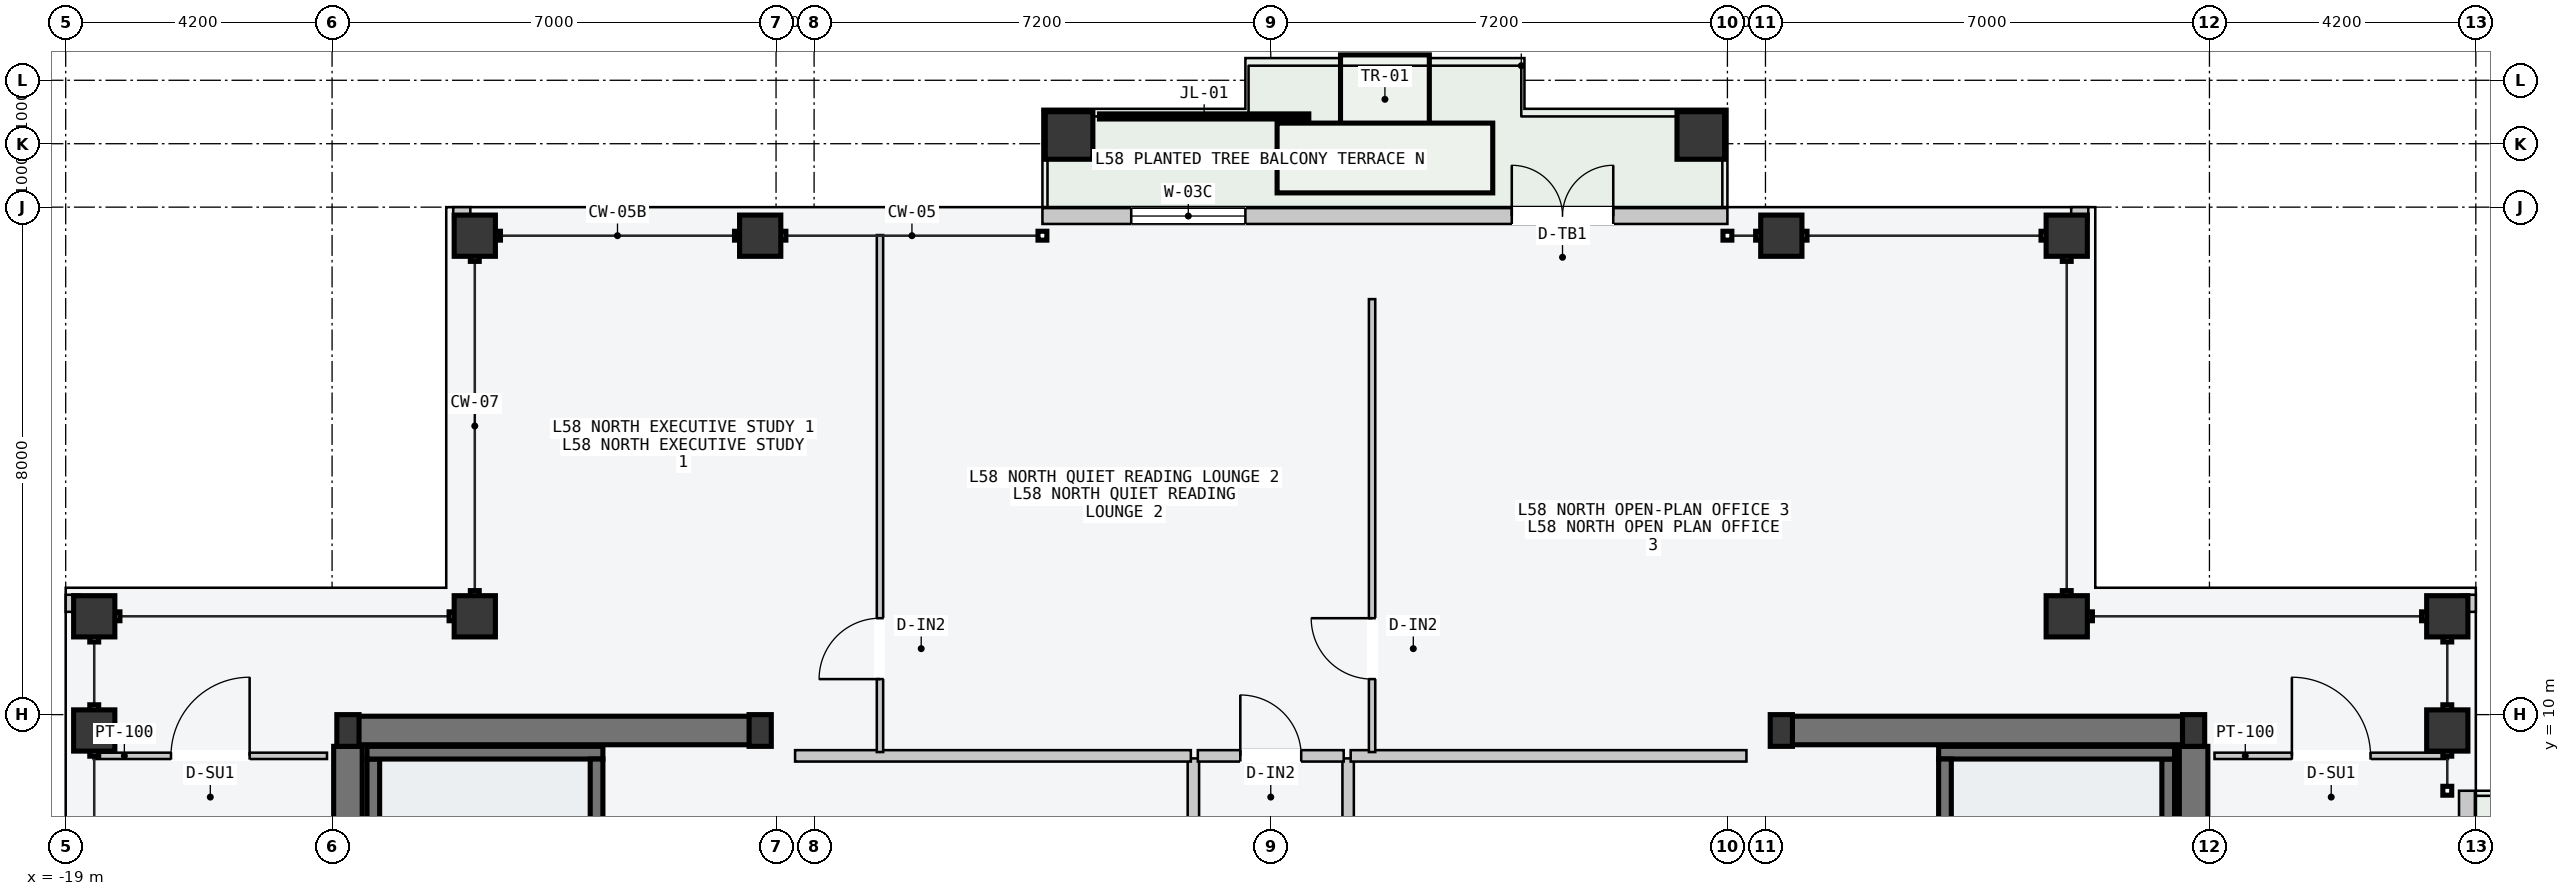
"""IFC4 building model, lengths in metres.
Left out: names, types, materials, properties, quantities, classifications, styles, units other than length and angle.
Written with IfcOpenShell. Run it as: python <this file> out.ifc"""

import sys

from ifc_helpers import new_model, si_unit, direction, frame, frame_2d, origin, origin_2d, place, context, subcontext, project, spatial, rectangle, hollow_rectangle, i_section, extrude, element, fill, save


model = new_model("IFC4")
c1 = context("Model", 3, precision=1e-05, world=origin(), true_north=direction((0.0, 1.0)))
c2 = subcontext(c1, "Body", "Model", "MODEL_VIEW")
j1 = project(units=[si_unit("LENGTHUNIT", "METRE"), si_unit("PLANEANGLEUNIT", "RADIAN")], contexts=[c1])
p1 = place(None, origin())
s1 = spatial("IfcSite", under=j1, at=p1, CompositionType="ELEMENT")
p2 = place(p1, origin())
s2 = spatial("IfcBuilding", under=s1, at=p2, CompositionType="ELEMENT")
p3 = place(p2, frame((0.0, 0.0, 222.0)))
s3 = spatial("IfcBuildingStorey", under=s2, at=p3, CompositionType="ELEMENT", Elevation=222.0)
p4 = place(p3, frame((-14.53, 9.75, -0.2), z_axis=(0.0, 0.0, 1.0), x_axis=(1.0, 0.0, 0.0)))
e1 = element("IfcWall", 1, at=p4, inside=s3, PredefinedType="SHEAR", context=c2, shape_type="SweptSolid", body=[
    extrude(rectangle(XDim=6.46, YDim=0.45, at=frame_2d((3.23, 0.0))), origin(), (0.0, 0.0, 1.0), 3.6),
])
p5 = place(p3, frame((-14.55, 0.25, -0.2), z_axis=(0.0, 0.0, 1.0), x_axis=(0.0, 1.0, 0.0)))
e2 = element("IfcWall", 2, at=p5, inside=s3, PredefinedType="SHEAR", context=c2, shape_type="SweptSolid", body=[
    extrude(rectangle(XDim=9.25, YDim=0.45, at=frame_2d((4.625, 0.0))), origin(), (0.0, 0.0, 1.0), 3.6),
])
p6 = place(p3, frame((8.07, 9.75, -0.2), z_axis=(0.0, 0.0, 1.0), x_axis=(1.0, 0.0, 0.0)))
e3 = element("IfcWall", 3, at=p6, inside=s3, PredefinedType="SHEAR", context=c2, shape_type="SweptSolid", body=[
    extrude(rectangle(XDim=6.46, YDim=0.45, at=frame_2d((3.23, 0.0))), origin(), (0.0, 0.0, 1.0), 3.6),
])
p7 = place(p3, frame((14.55, 0.25, -0.2), z_axis=(0.0, 0.0, 1.0), x_axis=(0.0, 1.0, 0.0)))
e4 = element("IfcWall", 4, at=p7, inside=s3, PredefinedType="SHEAR", context=c2, shape_type="SweptSolid", body=[
    extrude(rectangle(XDim=9.25, YDim=0.45, at=frame_2d((4.625, 0.0))), origin(), (0.0, 0.0, 1.0), 3.6),
])
for number, where, z_axis, x_axis in (
    (5, (-14.15, 1.5, -0.2), (0.0, 0.0, 1.0), (0.0, 1.0, 0.0)),
    (6, (14.15, 1.5, -0.2), (0.0, 0.0, 1.0), (0.0, 1.0, 0.0)),
):
    element("IfcWall", number, at=place(p3, frame(where, z_axis=z_axis, x_axis=x_axis)), inside=s3, PredefinedType="SOLIDWALL", context=c2, shape_type="SweptSolid", body=[
        extrude(rectangle(XDim=7.8, YDim=0.2, at=frame_2d((3.9, 0.0))), origin(), (0.0, 0.0, 1.0), 3.6),
    ])
p8 = place(p3, frame((-14.25, 9.4, -0.2), z_axis=(0.0, 0.0, 1.0), x_axis=(1.0, 0.0, 0.0)))
e7 = element("IfcWall", 7, at=p8, inside=s3, PredefinedType="SOLIDWALL", context=c2, shape_type="SweptSolid", body=[
    extrude(rectangle(XDim=3.72, YDim=0.2, at=frame_2d((1.86, 0.0))), origin(), (0.0, 0.0, 1.0), 3.6),
])
p9 = place(p3, frame((-10.63, 1.5, -0.2), z_axis=(0.0, 0.0, 1.0), x_axis=(0.0, 1.0, 0.0)))
e8 = element("IfcWall", 8, at=p9, inside=s3, PredefinedType="SOLIDWALL", context=c2, shape_type="SweptSolid", body=[
    extrude(rectangle(XDim=7.8, YDim=0.2, at=frame_2d((3.9, 0.0))), origin(), (0.0, 0.0, 1.0), 3.6),
])
p10 = place(p3, frame((10.53, 9.4, -0.2), z_axis=(0.0, 0.0, 1.0), x_axis=(1.0, 0.0, 0.0)))
e9 = element("IfcWall", 9, at=p10, inside=s3, PredefinedType="SOLIDWALL", context=c2, shape_type="SweptSolid", body=[
    extrude(rectangle(XDim=3.72, YDim=0.2, at=frame_2d((1.86, 0.0))), origin(), (0.0, 0.0, 1.0), 3.6),
])
p11 = place(p3, frame((10.63, 1.5, -0.2), z_axis=(0.0, 0.0, 1.0), x_axis=(0.0, 1.0, 0.0)))
e10 = element("IfcWall", 10, at=p11, inside=s3, PredefinedType="SOLIDWALL", context=c2, shape_type="SweptSolid", body=[
    extrude(rectangle(XDim=7.8, YDim=0.2, at=frame_2d((3.9, 0.0))), origin(), (0.0, 0.0, 1.0), 3.6),
])
for number, where, z_axis, x_axis in (
    (11, (-14.55, 9.75, 0.0), (0.0, 0.0, 1.0), (1.0, 0.0, 0.0)),
    (12, (-8.05, 9.75, 0.0), (0.0, 0.0, 1.0), (1.0, 0.0, 0.0)),
    (13, (8.05, 9.75, 0.0), (0.0, 0.0, 1.0), (1.0, 0.0, 0.0)),
    (14, (14.55, 9.75, 0.0), (0.0, 0.0, 1.0), (1.0, 0.0, 0.0)),
):
    element("IfcColumn", number, at=place(p3, frame(where, z_axis=z_axis, x_axis=x_axis)), inside=s3, PredefinedType="COLUMN", context=c2, shape_type="SweptSolid", body=[
        extrude(i_section(OverallWidth=0.35, OverallDepth=0.5, WebThickness=0.02, FlangeThickness=0.032, at=origin_2d()), origin(), (0.0, 0.0, 1.0), 3.6),
    ])
for number, where, z_axis, x_axis in (
    (15, (-12.55, 17.55, 0.0), (0.0, 0.0, 1.0), (1.0, 0.0, 0.0)),
    (16, (-8.05, 17.55, 0.0), (0.0, 0.0, 1.0), (1.0, 0.0, 0.0)),
    (17, (8.05, 17.55, 0.0), (0.0, 0.0, 1.0), (1.0, 0.0, 0.0)),
    (18, (12.55, 17.55, 0.0), (0.0, 0.0, 1.0), (1.0, 0.0, 0.0)),
    (19, (-18.55, 9.75, 0.0), (0.0, 0.0, 1.0), (0.0, 1.0, 0.0)),
    (20, (-18.55, 11.55, 0.0), (0.0, 0.0, 1.0), (0.0, 1.0, 0.0)),
    (21, (18.55, 9.75, 0.0), (0.0, 0.0, 1.0), (0.0, 1.0, 0.0)),
    (22, (18.55, 11.55, 0.0), (0.0, 0.0, 1.0), (0.0, 1.0, 0.0)),
    (23, (-12.55, 11.55, 0.0), (0.0, 0.0, 1.0), (1.0, 0.0, 0.0)),
    (24, (12.55, 11.55, 0.0), (0.0, 0.0, 1.0), (1.0, 0.0, 0.0)),
):
    element("IfcColumn", number, at=place(p3, frame(where, z_axis=z_axis, x_axis=x_axis)), inside=s3, PredefinedType="COLUMN", context=c2, shape_type="SweptSolid", body=[
        extrude(hollow_rectangle(XDim=0.65, YDim=0.65, WallThickness=0.028, at=origin_2d()), origin(), (0.0, 0.0, 1.0), 3.6),
    ])
for number, where, z_axis, x_axis in (
    (25, (-3.18, 19.13, -0.2), (0.0, 0.0, 1.0), (1.0, 0.0, 0.0)),
    (26, (6.78, 19.13, -0.2), (0.0, 0.0, 1.0), (1.0, 0.0, 0.0)),
):
    element("IfcColumn", number, at=place(p3, frame(where, z_axis=z_axis, x_axis=x_axis)), inside=s3, PredefinedType="COLUMN", context=c2, shape_type="SweptSolid", body=[
        extrude(hollow_rectangle(XDim=0.75, YDim=0.75, WallThickness=0.032, at=origin_2d()), origin(), (0.0, 0.0, 1.0), 3.8),
    ])
p12 = place(p3, frame((-3.6, 17.86, 0.0), z_axis=(0.0, 0.0, 1.0), x_axis=(1.0, 0.0, 0.0)))
e27 = element("IfcWall", 27, at=p12, inside=s3, PredefinedType="STANDARD", context=c2, shape_type="SweptSolid", body=[
    extrude(rectangle(XDim=10.8, YDim=0.25, at=frame_2d((5.4, 0.0))), origin(), (0.0, 0.0, 1.0), 3.4),
])
p13 = place(p12, frame((7.4, 0.0, 0.0)))
e28 = element("IfcOpeningElement", 28, at=p13, cuts=e27, PredefinedType="OPENING", context=c2, shape_type="SweptSolid", body=[
    extrude(rectangle(XDim=1.6, YDim=2.2, at=frame_2d((0.8, 1.1))), frame((0.0, 0.135, 0.0), z_axis=(0.0, -1.0, 0.0), x_axis=(1.0, 0.0, 0.0)), (0.0, 0.0, 1.0), 0.27),
])
p14 = place(p12, frame((1.4, 0.0, 0.85)))
e29 = element("IfcOpeningElement", 29, at=p14, cuts=e27, PredefinedType="OPENING", context=c2, shape_type="SweptSolid", body=[
    extrude(rectangle(XDim=1.8, YDim=2.05, at=frame_2d((0.9, 1.025))), frame((0.0, 0.135, 0.0), z_axis=(0.0, -1.0, 0.0), x_axis=(1.0, 0.0, 0.0)), (0.0, 0.0, 1.0), 0.27),
])
p15 = place(p3, frame((18.86, -2.0, 0.0), z_axis=(0.0, 0.0, 1.0), x_axis=(0.0, 1.0, 0.0)))
e30 = element("IfcWall", 30, at=p15, inside=s3, PredefinedType="STANDARD", context=c2, shape_type="SweptSolid", body=[
    extrude(rectangle(XDim=10.8, YDim=0.25, at=frame_2d((5.4, 0.0))), origin(), (0.0, 0.0, 1.0), 3.4),
])
p16 = place(p15, frame((6.6, 0.0, 0.0)))
e31 = element("IfcOpeningElement", 31, at=p16, cuts=e30, PredefinedType="OPENING", context=c2, shape_type="SweptSolid", body=[
    extrude(rectangle(XDim=1.6, YDim=2.2, at=frame_2d((0.8, 1.1))), frame((0.0, 0.135, 0.0), z_axis=(0.0, -1.0, 0.0), x_axis=(1.0, 0.0, 0.0)), (0.0, 0.0, 1.0), 0.27),
])
p17 = place(p15, frame((1.4, 0.0, 0.85)))
e32 = element("IfcOpeningElement", 32, at=p17, cuts=e30, PredefinedType="OPENING", context=c2, shape_type="SweptSolid", body=[
    extrude(rectangle(XDim=1.8, YDim=2.05, at=frame_2d((0.9, 1.025))), frame((0.0, 0.135, 0.0), z_axis=(0.0, -1.0, 0.0), x_axis=(1.0, 0.0, 0.0)), (0.0, 0.0, 1.0), 0.27),
])
for number, where, z_axis, x_axis in (
    (33, (-12.89, 17.89, 0.0), (0.0, 0.0, 1.0), (1.0, 0.0, 0.0)),
    (34, (-18.89, 11.62, 0.0), (0.0, 0.0, 1.0), (0.0, 1.0, 0.0)),
    (35, (12.62, 17.89, 0.0), (0.0, 0.0, 1.0), (1.0, 0.0, 0.0)),
    (36, (18.89, 11.62, 0.0), (0.0, 0.0, 1.0), (0.0, 1.0, 0.0)),
):
    element("IfcWall", number, at=place(p3, frame(where, z_axis=z_axis, x_axis=x_axis)), inside=s3, PredefinedType="PARAPET", context=c2, shape_type="SweptSolid", body=[
        extrude(rectangle(XDim=0.27, YDim=0.22, at=frame_2d((0.135, 0.0))), origin(), (0.0, 0.0, 1.0), 1.2),
    ])
p18 = place(p3, frame((-1.22, -3.5, 0.0), z_axis=(0.0, 0.0, 1.0), x_axis=(0.0, 1.0, 0.0)))
e37 = element("IfcWall", 37, at=p18, inside=s3, PredefinedType="PARTITIONING", context=c2, shape_type="SweptSolid", body=[
    extrude(rectangle(XDim=12.81, YDim=0.18, at=frame_2d((6.405, 0.0))), origin(), (0.0, 0.0, 1.0), 3.4),
])
p19 = place(p18, frame((6.1, 0.0, 0.0)))
e38 = element("IfcOpeningElement", 38, at=p19, cuts=e37, PredefinedType="OPENING", context=c2, shape_type="SweptSolid", body=[
    extrude(rectangle(XDim=1.24, YDim=2.24, at=frame_2d((0.62, 1.12))), frame((0.0, 0.1, 0.0), z_axis=(0.0, -1.0, 0.0), x_axis=(1.0, 0.0, 0.0)), (0.0, 0.0, 1.0), 0.2),
])
p20 = place(p18, frame((1.6, 0.0, 0.0)))
e39 = element("IfcOpeningElement", 39, at=p20, cuts=e37, PredefinedType="OPENING", context=c2, shape_type="SweptSolid", body=[
    extrude(rectangle(XDim=0.96, YDim=2.18, at=frame_2d((0.48, 1.09))), frame((0.0, 0.1, 0.0), z_axis=(0.0, -1.0, 0.0), x_axis=(1.0, 0.0, 0.0)), (0.0, 0.0, 1.0), 0.2),
])
p21 = place(p3, frame((-7.5, 9.35, 0.0), z_axis=(0.0, 0.0, 1.0), x_axis=(1.0, 0.0, 0.0)))
e40 = element("IfcWall", 40, at=p21, inside=s3, PredefinedType="PARTITIONING", context=c2, shape_type="SweptSolid", body=[
    extrude(rectangle(XDim=6.24, YDim=0.18, at=frame_2d((3.12, 0.0))), origin(), (0.0, 0.0, 1.0), 3.4),
])
p22 = place(p3, frame((1.22, -3.5, 0.0), z_axis=(0.0, 0.0, 1.0), x_axis=(0.0, 1.0, 0.0)))
e41 = element("IfcWall", 41, at=p22, inside=s3, PredefinedType="PARTITIONING", context=c2, shape_type="SweptSolid", body=[
    extrude(rectangle(XDim=12.81, YDim=0.18, at=frame_2d((6.405, 0.0))), origin(), (0.0, 0.0, 1.0), 3.4),
])
p23 = place(p22, frame((6.1, 0.0, 0.0)))
e42 = element("IfcOpeningElement", 42, at=p23, cuts=e41, PredefinedType="OPENING", context=c2, shape_type="SweptSolid", body=[
    extrude(rectangle(XDim=1.24, YDim=2.24, at=frame_2d((0.62, 1.12))), frame((0.0, 0.1, 0.0), z_axis=(0.0, -1.0, 0.0), x_axis=(1.0, 0.0, 0.0)), (0.0, 0.0, 1.0), 0.2),
])
p24 = place(p22, frame((1.6, 0.0, 0.0)))
e43 = element("IfcOpeningElement", 43, at=p24, cuts=e41, PredefinedType="OPENING", context=c2, shape_type="SweptSolid", body=[
    extrude(rectangle(XDim=0.96, YDim=2.18, at=frame_2d((0.48, 1.09))), frame((0.0, 0.1, 0.0), z_axis=(0.0, -1.0, 0.0), x_axis=(1.0, 0.0, 0.0)), (0.0, 0.0, 1.0), 0.2),
])
p25 = place(p3, frame((1.26, 9.35, 0.0), z_axis=(0.0, 0.0, 1.0), x_axis=(1.0, 0.0, 0.0)))
e44 = element("IfcWall", 44, at=p25, inside=s3, PredefinedType="PARTITIONING", context=c2, shape_type="SweptSolid", body=[
    extrude(rectangle(XDim=6.24, YDim=0.18, at=frame_2d((3.12, 0.0))), origin(), (0.0, 0.0, 1.0), 3.4),
])
p26 = place(p3, frame((-6.161, 9.41, 0.0), z_axis=(0.0, 0.0, 1.0), x_axis=(0.0, 1.0, 0.0)))
e45 = element("IfcWall", 45, at=p26, inside=s3, PredefinedType="PARTITIONING", context=c2, shape_type="SweptSolid", body=[
    extrude(rectangle(XDim=8.15, YDim=0.1, at=frame_2d((4.075, 0.0))), origin(), (0.0, 0.0, 1.0), 3.4),
])
p27 = place(p26, frame((1.15, 0.0, 0.0)))
e46 = element("IfcOpeningElement", 46, at=p27, cuts=e45, PredefinedType="OPENING", context=c2, shape_type="SweptSolid", body=[
    extrude(rectangle(XDim=0.96, YDim=2.18, at=frame_2d((0.48, 1.09))), frame((0.0, 0.06, 0.0), z_axis=(0.0, -1.0, 0.0), x_axis=(1.0, 0.0, 0.0)), (0.0, 0.0, 1.0), 0.12),
])
p28 = place(p3, frame((1.597, 9.41, 0.0), z_axis=(0.0, 0.0, 1.0), x_axis=(0.0, 1.0, 0.0)))
e47 = element("IfcWall", 47, at=p28, inside=s3, PredefinedType="PARTITIONING", context=c2, shape_type="SweptSolid", body=[
    extrude(rectangle(XDim=7.14, YDim=0.1, at=frame_2d((3.57, 0.0))), origin(), (0.0, 0.0, 1.0), 3.4),
])
p29 = place(p28, frame((1.15, 0.0, 0.0)))
e48 = element("IfcOpeningElement", 48, at=p29, cuts=e47, PredefinedType="OPENING", context=c2, shape_type="SweptSolid", body=[
    extrude(rectangle(XDim=0.96, YDim=2.18, at=frame_2d((0.48, 1.09))), frame((0.0, 0.06, 0.0), z_axis=(0.0, -1.0, 0.0), x_axis=(1.0, 0.0, 0.0)), (0.0, 0.0, 1.0), 0.12),
])
p30 = place(p3, frame((-1.15, 9.35, 0.0), z_axis=(0.0, 0.0, 1.0), x_axis=(1.0, 0.0, 0.0)))
e49 = element("IfcWall", 49, at=p30, inside=s3, PredefinedType="PARTITIONING", context=c2, shape_type="SweptSolid", body=[
    extrude(rectangle(XDim=2.3, YDim=0.18, at=frame_2d((1.15, 0.0))), origin(), (0.0, 0.0, 1.0), 3.4),
])
p31 = place(p30, frame((0.67, 0.0, 0.0)))
e50 = element("IfcOpeningElement", 50, at=p31, cuts=e49, PredefinedType="OPENING", context=c2, shape_type="SweptSolid", body=[
    extrude(rectangle(XDim=0.96, YDim=2.18, at=frame_2d((0.48, 1.09))), frame((0.0, 0.1, 0.0), z_axis=(0.0, -1.0, 0.0), x_axis=(1.0, 0.0, 0.0)), (0.0, 0.0, 1.0), 0.2),
])
p32 = place(p3, frame((-18.56, 9.35, 0.0), z_axis=(0.0, 0.0, 1.0), x_axis=(1.0, 0.0, 0.0)))
e51 = element("IfcWall", 51, at=p32, inside=s3, PredefinedType="PARTITIONING", context=c2, shape_type="SweptSolid", body=[
    extrude(rectangle(XDim=3.68, YDim=0.1, at=frame_2d((1.84, 0.0))), origin(), (0.0, 0.0, 1.0), 3.4),
])
p33 = place(p32, frame((1.22, 0.0, 0.0)))
e52 = element("IfcOpeningElement", 52, at=p33, cuts=e51, PredefinedType="OPENING", context=c2, shape_type="SweptSolid", body=[
    extrude(rectangle(XDim=1.24, YDim=2.24, at=frame_2d((0.62, 1.12))), frame((0.0, 0.06, 0.0), z_axis=(0.0, -1.0, 0.0), x_axis=(1.0, 0.0, 0.0)), (0.0, 0.0, 1.0), 0.12),
])
p34 = place(p3, frame((14.88, 9.35, 0.0), z_axis=(0.0, 0.0, 1.0), x_axis=(1.0, 0.0, 0.0)))
e53 = element("IfcWall", 53, at=p34, inside=s3, PredefinedType="PARTITIONING", context=c2, shape_type="SweptSolid", body=[
    extrude(rectangle(XDim=3.68, YDim=0.1, at=frame_2d((1.84, 0.0))), origin(), (0.0, 0.0, 1.0), 3.4),
])
p35 = place(p34, frame((1.22, 0.0, 0.0)))
e54 = element("IfcOpeningElement", 54, at=p35, cuts=e53, PredefinedType="OPENING", context=c2, shape_type="SweptSolid", body=[
    extrude(rectangle(XDim=1.24, YDim=2.24, at=frame_2d((0.62, 1.12))), frame((0.0, 0.06, 0.0), z_axis=(0.0, -1.0, 0.0), x_axis=(1.0, 0.0, 0.0)), (0.0, 0.0, 1.0), 0.12),
])
p36 = place(p13, origin())
e55 = element("IfcDoor", 55, at=p36, inside=s3, OperationType="DOUBLE_DOOR_SINGLE_SWING", PredefinedType="DOOR", context=c2, shape_type="SweptSolid", body=[
    extrude(rectangle(XDim=1.6, YDim=2.2, at=frame_2d((0.8, 1.1))), frame((0.0, 0.025, 0.0), z_axis=(0.0, -1.0, 0.0), x_axis=(1.0, 0.0, 0.0)), (0.0, 0.0, 1.0), 0.05),
])
fill(e28, e55)
p37 = place(p14, origin())
e56 = element("IfcWindow", 56, at=p37, inside=s3, PartitioningType="SINGLE_PANEL", PredefinedType="WINDOW", context=c2, shape_type="SweptSolid", body=[
    extrude(rectangle(XDim=1.8, YDim=2.05, at=frame_2d((0.9, 1.025))), frame((0.0, 0.03, 0.0), z_axis=(0.0, -1.0, 0.0), x_axis=(1.0, 0.0, 0.0)), (0.0, 0.0, 1.0), 0.06),
])
fill(e29, e56)
p38 = place(p27, origin())
e57 = element("IfcDoor", 57, at=p38, inside=s3, OperationType="SINGLE_SWING_LEFT", PredefinedType="DOOR", context=c2, shape_type="SweptSolid", body=[
    extrude(rectangle(XDim=0.96, YDim=2.18, at=frame_2d((0.48, 1.09))), frame((0.0, 0.025, 0.0), z_axis=(0.0, -1.0, 0.0), x_axis=(1.0, 0.0, 0.0)), (0.0, 0.0, 1.0), 0.05),
])
fill(e46, e57)
p39 = place(p29, origin())
e58 = element("IfcDoor", 58, at=p39, inside=s3, OperationType="SINGLE_SWING_RIGHT", PredefinedType="DOOR", context=c2, shape_type="SweptSolid", body=[
    extrude(rectangle(XDim=0.96, YDim=2.18, at=frame_2d((0.48, 1.09))), frame((0.0, 0.025, 0.0), z_axis=(0.0, -1.0, 0.0), x_axis=(1.0, 0.0, 0.0)), (0.0, 0.0, 1.0), 0.05),
])
fill(e48, e58)
p40 = place(p31, origin())
e59 = element("IfcDoor", 59, at=p40, inside=s3, OperationType="SINGLE_SWING_LEFT", PredefinedType="DOOR", context=c2, shape_type="SweptSolid", body=[
    extrude(rectangle(XDim=0.96, YDim=2.18, at=frame_2d((0.48, 1.09))), frame((0.0, 0.025, 0.0), z_axis=(0.0, -1.0, 0.0), x_axis=(1.0, 0.0, 0.0)), (0.0, 0.0, 1.0), 0.05),
])
fill(e50, e59)
p41 = place(p33, origin())
e60 = element("IfcDoor", 60, at=p41, inside=s3, OperationType="SINGLE_SWING_RIGHT", PredefinedType="DOOR", context=c2, shape_type="SweptSolid", body=[
    extrude(rectangle(XDim=1.24, YDim=2.24, at=frame_2d((0.62, 1.12))), frame((0.0, 0.025, 0.0), z_axis=(0.0, -1.0, 0.0), x_axis=(1.0, 0.0, 0.0)), (0.0, 0.0, 1.0), 0.05),
])
fill(e52, e60)
p42 = place(p35, origin())
e61 = element("IfcDoor", 61, at=p42, inside=s3, OperationType="SINGLE_SWING_LEFT", PredefinedType="DOOR", context=c2, shape_type="SweptSolid", body=[
    extrude(rectangle(XDim=1.24, YDim=2.24, at=frame_2d((0.62, 1.12))), frame((0.0, 0.025, 0.0), z_axis=(0.0, -1.0, 0.0), x_axis=(1.0, 0.0, 0.0)), (0.0, 0.0, 1.0), 0.05),
])
fill(e54, e61)
save(model, sys.argv[1])
